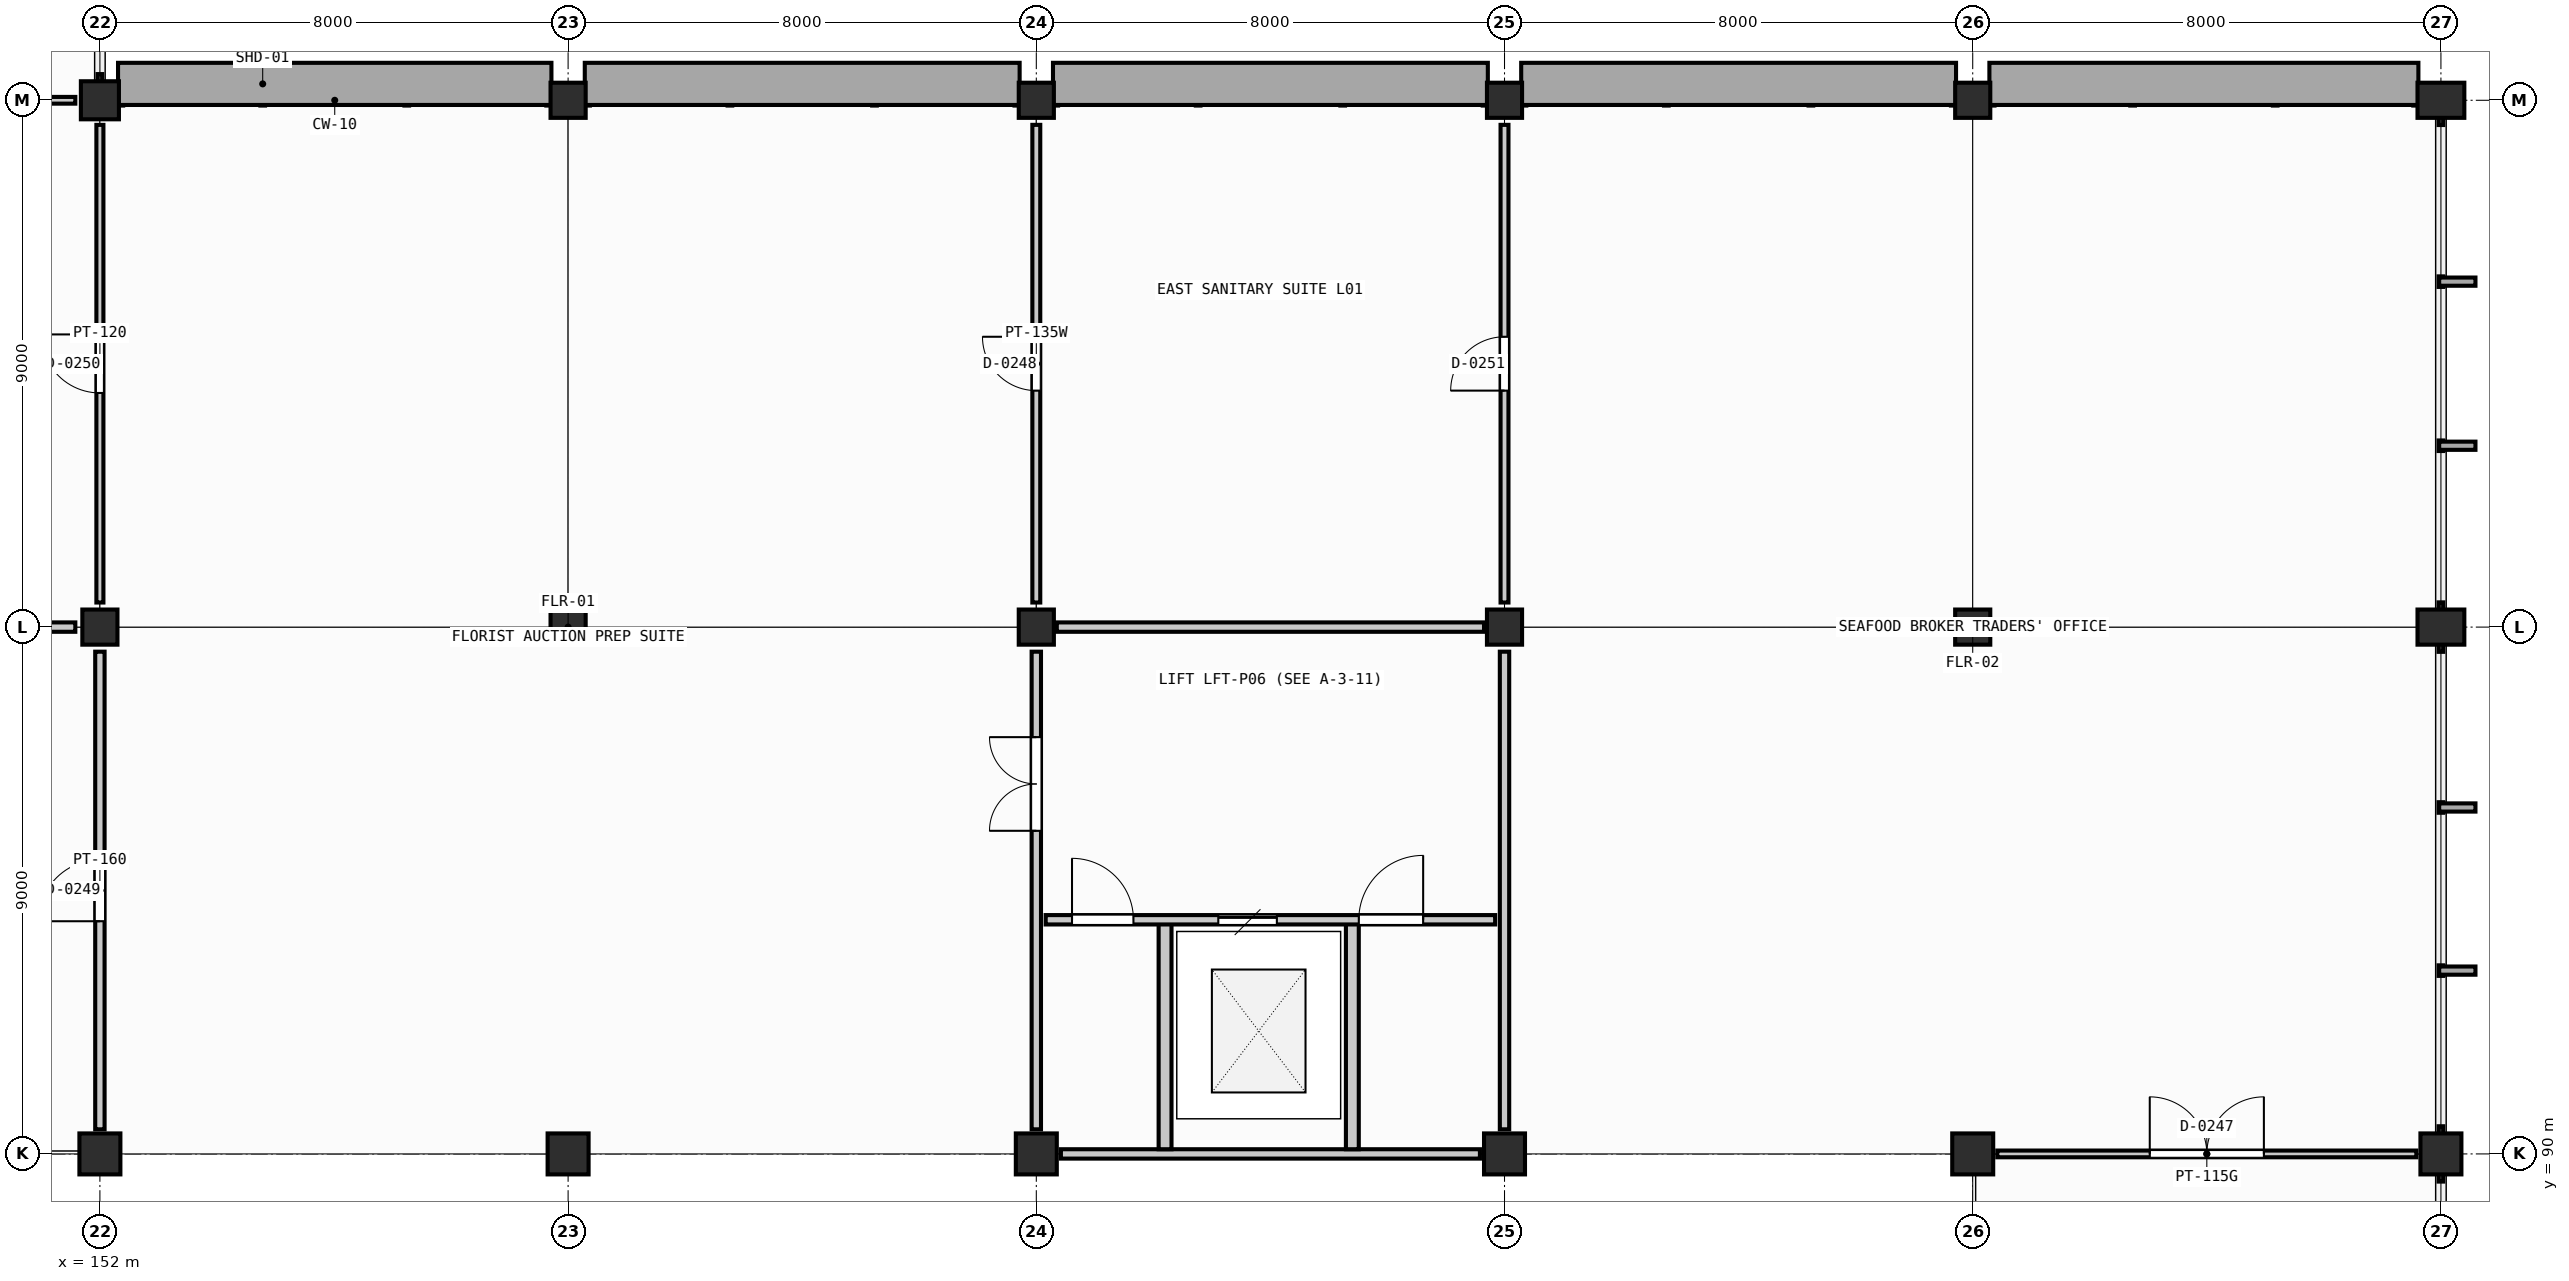
"""IFC4 building model, lengths in metres.
Left out: names, types, materials, properties, quantities, classifications, styles, units other than length and angle.
Written with IfcOpenShell. Run it as: python <this file> out.ifc"""

import sys

from ifc_helpers import new_model, si_unit, direction, frame, frame_2d, origin, origin_2d, place, context, subcontext, project, spatial, rectangle, extrude, element, fill, save


model = new_model("IFC4")
c1 = context("Model", 3, precision=1e-05, world=origin(), true_north=direction((0.0, 1.0)))
c2 = subcontext(c1, "Body", "Model", "MODEL_VIEW")
j1 = project(units=[si_unit("LENGTHUNIT", "METRE"), si_unit("PLANEANGLEUNIT", "RADIAN")], contexts=[c1])
p1 = place(None, origin())
s1 = spatial("IfcSite", under=j1, at=p1, CompositionType="ELEMENT")
p2 = place(p1, origin())
s2 = spatial("IfcBuilding", under=s1, at=p2, CompositionType="ELEMENT")
p3 = place(p2, frame((0.0, 0.0, 4.8)))
s3 = spatial("IfcBuildingStorey", under=s2, at=p3, CompositionType="ELEMENT", Elevation=4.8)
p4 = place(p3, frame((152.0, 90.0, 0.0), z_axis=(0.0, 0.0, 1.0), x_axis=(1.0, 0.0, 0.0)))
e1 = element("IfcColumn", 1, at=p4, inside=s3, PredefinedType="COLUMN", context=c2, shape_type="SweptSolid", body=[
    extrude(rectangle(XDim=0.7, YDim=0.7, at=origin_2d()), origin(), (0.0, 0.0, 1.0), 4.2),
])
p5 = place(p3, frame((152.0, 99.0, 0.0), z_axis=(0.0, 0.0, 1.0), x_axis=(1.0, 0.0, 0.0)))
e2 = element("IfcColumn", 2, at=p5, inside=s3, PredefinedType="COLUMN", context=c2, shape_type="SweptSolid", body=[
    extrude(rectangle(XDim=0.6, YDim=0.6, at=origin_2d()), origin(), (0.0, 0.0, 1.0), 4.2),
])
p6 = place(p3, frame((152.0, 108.0, 0.0), z_axis=(0.0, 0.0, 1.0), x_axis=(1.0, 0.0, 0.0)))
e3 = element("IfcColumn", 3, at=p6, inside=s3, PredefinedType="COLUMN", context=c2, shape_type="SweptSolid", body=[
    extrude(rectangle(XDim=0.65, YDim=0.65, at=origin_2d()), origin(), (0.0, 0.0, 1.0), 4.2),
])
p7 = place(p3, frame((160.0, 90.0, 0.0), z_axis=(0.0, 0.0, 1.0), x_axis=(1.0, 0.0, 0.0)))
e4 = element("IfcColumn", 4, at=p7, inside=s3, PredefinedType="COLUMN", context=c2, shape_type="SweptSolid", body=[
    extrude(rectangle(XDim=0.7, YDim=0.7, at=origin_2d()), origin(), (0.0, 0.0, 1.0), 4.2),
])
for number, where, z_axis, x_axis in (
    (5, (160.0, 99.0, 0.0), (0.0, 0.0, 1.0), (1.0, 0.0, 0.0)),
    (6, (160.0, 108.0, 0.0), (0.0, 0.0, 1.0), (1.0, 0.0, 0.0)),
):
    element("IfcColumn", number, at=place(p3, frame(where, z_axis=z_axis, x_axis=x_axis)), inside=s3, PredefinedType="COLUMN", context=c2, shape_type="SweptSolid", body=[
        extrude(rectangle(XDim=0.6, YDim=0.6, at=origin_2d()), origin(), (0.0, 0.0, 1.0), 4.2),
    ])
p8 = place(p3, frame((168.0, 90.0, 0.0), z_axis=(0.0, 0.0, 1.0), x_axis=(1.0, 0.0, 0.0)))
e7 = element("IfcColumn", 7, at=p8, inside=s3, PredefinedType="COLUMN", context=c2, shape_type="SweptSolid", body=[
    extrude(rectangle(XDim=0.7, YDim=0.7, at=origin_2d()), origin(), (0.0, 0.0, 1.0), 4.2),
])
for number, where, z_axis, x_axis in (
    (8, (168.0, 99.0, 0.0), (0.0, 0.0, 1.0), (1.0, 0.0, 0.0)),
    (9, (168.0, 108.0, 0.0), (0.0, 0.0, 1.0), (1.0, 0.0, 0.0)),
):
    element("IfcColumn", number, at=place(p3, frame(where, z_axis=z_axis, x_axis=x_axis)), inside=s3, PredefinedType="COLUMN", context=c2, shape_type="SweptSolid", body=[
        extrude(rectangle(XDim=0.6, YDim=0.6, at=origin_2d()), origin(), (0.0, 0.0, 1.0), 4.2),
    ])
p9 = place(p3, frame((176.0, 90.0, 0.0), z_axis=(0.0, 0.0, 1.0), x_axis=(1.0, 0.0, 0.0)))
e10 = element("IfcColumn", 10, at=p9, inside=s3, PredefinedType="COLUMN", context=c2, shape_type="SweptSolid", body=[
    extrude(rectangle(XDim=0.7, YDim=0.7, at=origin_2d()), origin(), (0.0, 0.0, 1.0), 4.2),
])
for number, where, z_axis, x_axis in (
    (11, (176.0, 99.0, 0.0), (0.0, 0.0, 1.0), (1.0, 0.0, 0.0)),
    (12, (176.0, 108.0, 0.0), (0.0, 0.0, 1.0), (1.0, 0.0, 0.0)),
):
    element("IfcColumn", number, at=place(p3, frame(where, z_axis=z_axis, x_axis=x_axis)), inside=s3, PredefinedType="COLUMN", context=c2, shape_type="SweptSolid", body=[
        extrude(rectangle(XDim=0.6, YDim=0.6, at=origin_2d()), origin(), (0.0, 0.0, 1.0), 4.2),
    ])
p10 = place(p3, frame((184.0, 90.0, 0.0), z_axis=(0.0, 0.0, 1.0), x_axis=(1.0, 0.0, 0.0)))
e13 = element("IfcColumn", 13, at=p10, inside=s3, PredefinedType="COLUMN", context=c2, shape_type="SweptSolid", body=[
    extrude(rectangle(XDim=0.7, YDim=0.7, at=origin_2d()), origin(), (0.0, 0.0, 1.0), 4.2),
])
for number, where, z_axis, x_axis in (
    (14, (184.0, 99.0, 0.0), (0.0, 0.0, 1.0), (1.0, 0.0, 0.0)),
    (15, (184.0, 108.0, 0.0), (0.0, 0.0, 1.0), (1.0, 0.0, 0.0)),
):
    element("IfcColumn", number, at=place(p3, frame(where, z_axis=z_axis, x_axis=x_axis)), inside=s3, PredefinedType="COLUMN", context=c2, shape_type="SweptSolid", body=[
        extrude(rectangle(XDim=0.6, YDim=0.6, at=origin_2d()), origin(), (0.0, 0.0, 1.0), 4.2),
    ])
p11 = place(p3, frame((192.0, 90.0, 0.0), z_axis=(0.0, 0.0, 1.0), x_axis=(1.0, 0.0, 0.0)))
e16 = element("IfcColumn", 16, at=p11, inside=s3, PredefinedType="COLUMN", context=c2, shape_type="SweptSolid", body=[
    extrude(rectangle(XDim=0.7, YDim=0.7, at=origin_2d()), origin(), (0.0, 0.0, 1.0), 4.2),
])
for number, where, z_axis, x_axis in (
    (17, (192.0, 99.0, 0.0), (0.0, 0.0, 1.0), (1.0, 0.0, 0.0)),
    (18, (192.0, 108.0, 0.0), (0.0, 0.0, 1.0), (1.0, 0.0, 0.0)),
):
    element("IfcColumn", number, at=place(p3, frame(where, z_axis=z_axis, x_axis=x_axis)), inside=s3, PredefinedType="COLUMN", context=c2, shape_type="SweptSolid", body=[
        extrude(rectangle(XDim=0.8, YDim=0.6, at=origin_2d()), origin(), (0.0, 0.0, 1.0), 4.2),
    ])
p12 = place(p3, frame((168.0, 90.42, 0.0), z_axis=(0.0, 0.0, 1.0), x_axis=(0.0, 1.0, 0.0)))
e19 = element("IfcWall", 19, at=p12, inside=s3, PredefinedType="PARTITIONING", context=c2, shape_type="SweptSolid", body=[
    extrude(rectangle(XDim=8.16, YDim=0.16, at=frame_2d((4.08, 0.0))), origin(), (0.0, 0.0, 1.0), 3.05),
])
p13 = place(p12, frame((5.1, 0.0, 0.0)))
e20 = element("IfcOpeningElement", 20, at=p13, cuts=e19, PredefinedType="OPENING", context=c2, shape_type="SweptSolid", body=[
    extrude(rectangle(XDim=1.6, YDim=2.2, at=frame_2d((0.8, 1.1))), frame((0.0, 0.09, 0.0), z_axis=(0.0, -1.0, 0.0), x_axis=(1.0, 0.0, 0.0)), (0.0, 0.0, 1.0), 0.18),
])
p14 = place(p3, frame((176.0, 90.42, 0.0), z_axis=(0.0, 0.0, 1.0), x_axis=(0.0, 1.0, 0.0)))
e21 = element("IfcWall", 21, at=p14, inside=s3, PredefinedType="PARTITIONING", context=c2, shape_type="SweptSolid", body=[
    extrude(rectangle(XDim=8.16, YDim=0.16, at=frame_2d((4.08, 0.0))), origin(), (0.0, 0.0, 1.0), 3.05),
])
p15 = place(p3, frame((168.42, 90.0, 0.0), z_axis=(0.0, 0.0, 1.0), x_axis=(1.0, 0.0, 0.0)))
e22 = element("IfcWall", 22, at=p15, inside=s3, PredefinedType="PARTITIONING", context=c2, shape_type="SweptSolid", body=[
    extrude(rectangle(XDim=7.16, YDim=0.16, at=frame_2d((3.58, 0.0))), origin(), (0.0, 0.0, 1.0), 3.05),
])
for number, where, z_axis, x_axis in (
    (23, (170.2, 90.08, 0.0), (0.0, 0.0, 1.0), (0.0, 1.0, 0.0)),
    (24, (173.4, 90.08, 0.0), (0.0, 0.0, 1.0), (0.0, 1.0, 0.0)),
):
    element("IfcWall", number, at=place(p3, frame(where, z_axis=z_axis, x_axis=x_axis)), inside=s3, PredefinedType="SOLIDWALL", context=c2, shape_type="SweptSolid", body=[
        extrude(rectangle(XDim=3.92, YDim=0.22, at=frame_2d((1.96, 0.0))), origin(), (0.0, 0.0, 1.0), 3.05),
    ])
p16 = place(p3, frame((168.16, 94.0, 0.0), z_axis=(0.0, 0.0, 1.0), x_axis=(1.0, 0.0, 0.0)))
e25 = element("IfcWall", 25, at=p16, inside=s3, PredefinedType="PARTITIONING", context=c2, shape_type="SweptSolid", body=[
    extrude(rectangle(XDim=7.68, YDim=0.16, at=frame_2d((3.84, 0.0))), origin(), (0.0, 0.0, 1.0), 3.05),
])
p17 = place(p16, frame((0.45, 0.0, 0.0)))
e26 = element("IfcOpeningElement", 26, at=p17, cuts=e25, PredefinedType="OPENING", context=c2, shape_type="SweptSolid", body=[
    extrude(rectangle(XDim=1.05, YDim=2.1, at=frame_2d((0.525, 1.05))), frame((0.0, 0.09, 0.0), z_axis=(0.0, -1.0, 0.0), x_axis=(1.0, 0.0, 0.0)), (0.0, 0.0, 1.0), 0.18),
])
p18 = place(p16, frame((2.95, 0.0, 0.0)))
e27 = element("IfcOpeningElement", 27, at=p18, cuts=e25, PredefinedType="OPENING", context=c2, shape_type="SweptSolid", body=[
    extrude(rectangle(XDim=1.0, YDim=2.15, at=frame_2d((0.5, 1.075))), frame((0.0, 0.09, 0.0), z_axis=(0.0, -1.0, 0.0), x_axis=(1.0, 0.0, 0.0)), (0.0, 0.0, 1.0), 0.18),
])
p19 = place(p16, frame((5.35, 0.0, 0.0)))
e28 = element("IfcOpeningElement", 28, at=p19, cuts=e25, PredefinedType="OPENING", context=c2, shape_type="SweptSolid", body=[
    extrude(rectangle(XDim=1.1, YDim=2.15, at=frame_2d((0.55, 1.075))), frame((0.0, 0.09, 0.0), z_axis=(0.0, -1.0, 0.0), x_axis=(1.0, 0.0, 0.0)), (0.0, 0.0, 1.0), 0.18),
])
p20 = place(p3, frame((168.35, 99.0, 0.0), z_axis=(0.0, 0.0, 1.0), x_axis=(1.0, 0.0, 0.0)))
e29 = element("IfcWall", 29, at=p20, inside=s3, PredefinedType="PARTITIONING", context=c2, shape_type="SweptSolid", body=[
    extrude(rectangle(XDim=7.3, YDim=0.16, at=frame_2d((3.65, 0.0))), origin(), (0.0, 0.0, 1.0), 3.05),
])
p21 = place(p3, frame((184.42, 90.0, 0.0), z_axis=(0.0, 0.0, 1.0), x_axis=(1.0, 0.0, 0.0)))
e30 = element("IfcWall", 30, at=p21, inside=s3, PredefinedType="PARTITIONING", context=c2, shape_type="SweptSolid", body=[
    extrude(rectangle(XDim=7.16, YDim=0.115, at=frame_2d((3.58, 0.0))), origin(), (0.0, 0.0, 1.0), 3.05),
])
p22 = place(p21, frame((2.605, 0.0, 0.0)))
e31 = element("IfcOpeningElement", 31, at=p22, cuts=e30, PredefinedType="OPENING", context=c2, shape_type="SweptSolid", body=[
    extrude(rectangle(XDim=1.95, YDim=2.3, at=frame_2d((0.975, 1.15))), frame((0.0, 0.067, 0.0), z_axis=(0.0, -1.0, 0.0), x_axis=(1.0, 0.0, 0.0)), (0.0, 0.0, 1.0), 0.135),
])
p23 = place(p3, frame((168.0, 99.42, 0.0), z_axis=(0.0, 0.0, 1.0), x_axis=(0.0, 1.0, 0.0)))
e32 = element("IfcWall", 32, at=p23, inside=s3, PredefinedType="PLUMBINGWALL", context=c2, shape_type="SweptSolid", body=[
    extrude(rectangle(XDim=8.16, YDim=0.135, at=frame_2d((4.08, 0.0))), origin(), (0.0, 0.0, 1.0), 3.05),
])
p24 = place(p23, frame((3.62, 0.0, 0.0)))
e33 = element("IfcOpeningElement", 33, at=p24, cuts=e32, PredefinedType="OPENING", context=c2, shape_type="SweptSolid", body=[
    extrude(rectangle(XDim=0.92, YDim=2.08, at=frame_2d((0.46, 1.04))), frame((0.0, 0.078, 0.0), z_axis=(0.0, -1.0, 0.0), x_axis=(1.0, 0.0, 0.0)), (0.0, 0.0, 1.0), 0.155),
])
p25 = place(p3, frame((152.0, 90.42, 0.0), z_axis=(0.0, 0.0, 1.0), x_axis=(0.0, 1.0, 0.0)))
e34 = element("IfcWall", 34, at=p25, inside=s3, PredefinedType="PARTITIONING", context=c2, shape_type="SweptSolid", body=[
    extrude(rectangle(XDim=8.16, YDim=0.16, at=frame_2d((4.08, 0.0))), origin(), (0.0, 0.0, 1.0), 3.05),
])
p26 = place(p25, frame((3.555, 0.0, 0.0)))
e35 = element("IfcOpeningElement", 35, at=p26, cuts=e34, PredefinedType="OPENING", context=c2, shape_type="SweptSolid", body=[
    extrude(rectangle(XDim=1.05, YDim=2.15, at=frame_2d((0.525, 1.075))), frame((0.0, 0.09, 0.0), z_axis=(0.0, -1.0, 0.0), x_axis=(1.0, 0.0, 0.0)), (0.0, 0.0, 1.0), 0.18),
])
p27 = place(p3, frame((152.0, 99.42, 0.0), z_axis=(0.0, 0.0, 1.0), x_axis=(0.0, 1.0, 0.0)))
e36 = element("IfcWall", 36, at=p27, inside=s3, PredefinedType="PARTITIONING", context=c2, shape_type="SweptSolid", body=[
    extrude(rectangle(XDim=8.16, YDim=0.12, at=frame_2d((4.08, 0.0))), origin(), (0.0, 0.0, 1.0), 3.05),
])
p28 = place(p27, frame((3.58, 0.0, 0.0)))
e37 = element("IfcOpeningElement", 37, at=p28, cuts=e36, PredefinedType="OPENING", context=c2, shape_type="SweptSolid", body=[
    extrude(rectangle(XDim=1.0, YDim=2.1, at=frame_2d((0.5, 1.05))), frame((0.0, 0.07, 0.0), z_axis=(0.0, -1.0, 0.0), x_axis=(1.0, 0.0, 0.0)), (0.0, 0.0, 1.0), 0.14),
])
p29 = place(p3, frame((176.0, 99.42, 0.0), z_axis=(0.0, 0.0, 1.0), x_axis=(0.0, 1.0, 0.0)))
e38 = element("IfcWall", 38, at=p29, inside=s3, PredefinedType="PLUMBINGWALL", context=c2, shape_type="SweptSolid", body=[
    extrude(rectangle(XDim=8.16, YDim=0.135, at=frame_2d((4.08, 0.0))), origin(), (0.0, 0.0, 1.0), 3.05),
])
p30 = place(p29, frame((3.62, 0.0, 0.0)))
e39 = element("IfcOpeningElement", 39, at=p30, cuts=e38, PredefinedType="OPENING", context=c2, shape_type="SweptSolid", body=[
    extrude(rectangle(XDim=0.92, YDim=2.08, at=frame_2d((0.46, 1.04))), frame((0.0, 0.078, 0.0), z_axis=(0.0, -1.0, 0.0), x_axis=(1.0, 0.0, 0.0)), (0.0, 0.0, 1.0), 0.155),
])
p31 = place(p3, frame((144.42, 99.0, 0.0), z_axis=(0.0, 0.0, 1.0), x_axis=(1.0, 0.0, 0.0)))
e40 = element("IfcWall", 40, at=p31, inside=s3, PredefinedType="PARTITIONING", context=c2, shape_type="SweptSolid", body=[
    extrude(rectangle(XDim=7.16, YDim=0.16, at=frame_2d((3.58, 0.0))), origin(), (0.0, 0.0, 1.0), 3.05),
])
p32 = place(p31, frame((3.01, 0.0, 0.0)))
e41 = element("IfcOpeningElement", 41, at=p32, cuts=e40, PredefinedType="OPENING", context=c2, shape_type="SweptSolid", body=[
    extrude(rectangle(XDim=1.14, YDim=2.19, at=frame_2d((0.57, 1.095))), frame((0.0, 0.09, 0.0), z_axis=(0.0, -1.0, 0.0), x_axis=(1.0, 0.0, 0.0)), (0.0, 0.0, 1.0), 0.18),
])
p33 = place(p3, frame((144.42, 108.0, 0.0), z_axis=(0.0, 0.0, 1.0), x_axis=(1.0, 0.0, 0.0)))
e42 = element("IfcWall", 42, at=p33, inside=s3, PredefinedType="PARTITIONING", context=c2, shape_type="SweptSolid", body=[
    extrude(rectangle(XDim=7.16, YDim=0.115, at=frame_2d((3.58, 0.0))), origin(), (0.0, 0.0, 1.0), 3.05),
])
p34 = place(p33, frame((2.38, 0.0, 0.0)))
e43 = element("IfcOpeningElement", 43, at=p34, cuts=e42, PredefinedType="OPENING", context=c2, shape_type="SweptSolid", body=[
    extrude(rectangle(XDim=2.4, YDim=2.4, at=frame_2d((1.2, 1.2))), frame((0.0, 0.067, 0.0), z_axis=(0.0, -1.0, 0.0), x_axis=(1.0, 0.0, 0.0)), (0.0, 0.0, 1.0), 0.135),
])
p35 = place(p17, origin())
e44 = element("IfcDoor", 44, at=p35, inside=s3, OperationType="SINGLE_SWING_LEFT", PredefinedType="DOOR", context=c2, shape_type="SweptSolid", body=[
    extrude(rectangle(XDim=1.05, YDim=2.1, at=frame_2d((0.525, 1.05))), frame((0.0, 0.025, 0.0), z_axis=(0.0, -1.0, 0.0), x_axis=(1.0, 0.0, 0.0)), (0.0, 0.0, 1.0), 0.05),
])
fill(e26, e44)
p36 = place(p18, origin())
e45 = element("IfcDoor", 45, at=p36, inside=s3, OperationType="SLIDING_TO_LEFT", PredefinedType="DOOR", context=c2, shape_type="SweptSolid", body=[
    extrude(rectangle(XDim=1.0, YDim=2.15, at=frame_2d((0.5, 1.075))), frame((0.0, 0.025, 0.0), z_axis=(0.0, -1.0, 0.0), x_axis=(1.0, 0.0, 0.0)), (0.0, 0.0, 1.0), 0.05),
])
fill(e27, e45)
p37 = place(p19, origin())
e46 = element("IfcDoor", 46, at=p37, inside=s3, OperationType="SINGLE_SWING_RIGHT", PredefinedType="DOOR", context=c2, shape_type="SweptSolid", body=[
    extrude(rectangle(XDim=1.1, YDim=2.15, at=frame_2d((0.55, 1.075))), frame((0.0, 0.025, 0.0), z_axis=(0.0, -1.0, 0.0), x_axis=(1.0, 0.0, 0.0)), (0.0, 0.0, 1.0), 0.05),
])
fill(e28, e46)
p38 = place(p13, origin())
e47 = element("IfcDoor", 47, at=p38, inside=s3, OperationType="DOUBLE_DOOR_SINGLE_SWING", PredefinedType="DOOR", context=c2, shape_type="SweptSolid", body=[
    extrude(rectangle(XDim=1.6, YDim=2.2, at=frame_2d((0.8, 1.1))), frame((0.0, 0.025, 0.0), z_axis=(0.0, -1.0, 0.0), x_axis=(1.0, 0.0, 0.0)), (0.0, 0.0, 1.0), 0.05),
])
fill(e20, e47)
p39 = place(p22, origin())
e48 = element("IfcDoor", 48, at=p39, inside=s3, OperationType="DOUBLE_DOOR_SINGLE_SWING", PredefinedType="DOOR", context=c2, shape_type="SweptSolid", body=[
    extrude(rectangle(XDim=1.95, YDim=2.3, at=frame_2d((0.975, 1.15))), frame((0.0, 0.025, 0.0), z_axis=(0.0, -1.0, 0.0), x_axis=(1.0, 0.0, 0.0)), (0.0, 0.0, 1.0), 0.05),
])
fill(e31, e48)
p40 = place(p24, origin())
e49 = element("IfcDoor", 49, at=p40, inside=s3, OperationType="SINGLE_SWING_RIGHT", PredefinedType="DOOR", context=c2, shape_type="SweptSolid", body=[
    extrude(rectangle(XDim=0.92, YDim=2.08, at=frame_2d((0.46, 1.04))), frame((0.0, 0.025, 0.0), z_axis=(0.0, -1.0, 0.0), x_axis=(1.0, 0.0, 0.0)), (0.0, 0.0, 1.0), 0.05),
])
fill(e33, e49)
p41 = place(p26, origin())
e50 = element("IfcDoor", 50, at=p41, inside=s3, OperationType="SINGLE_SWING_LEFT", PredefinedType="DOOR", context=c2, shape_type="SweptSolid", body=[
    extrude(rectangle(XDim=1.05, YDim=2.15, at=frame_2d((0.525, 1.075))), frame((0.0, 0.025, 0.0), z_axis=(0.0, -1.0, 0.0), x_axis=(1.0, 0.0, 0.0)), (0.0, 0.0, 1.0), 0.05),
])
fill(e35, e50)
p42 = place(p28, origin())
e51 = element("IfcDoor", 51, at=p42, inside=s3, OperationType="SINGLE_SWING_RIGHT", PredefinedType="DOOR", context=c2, shape_type="SweptSolid", body=[
    extrude(rectangle(XDim=1.0, YDim=2.1, at=frame_2d((0.5, 1.05))), frame((0.0, 0.025, 0.0), z_axis=(0.0, -1.0, 0.0), x_axis=(1.0, 0.0, 0.0)), (0.0, 0.0, 1.0), 0.05),
])
fill(e37, e51)
p43 = place(p30, origin())
e52 = element("IfcDoor", 52, at=p43, inside=s3, OperationType="SINGLE_SWING_LEFT", PredefinedType="DOOR", context=c2, shape_type="SweptSolid", body=[
    extrude(rectangle(XDim=0.92, YDim=2.08, at=frame_2d((0.46, 1.04))), frame((0.0, 0.025, 0.0), z_axis=(0.0, -1.0, 0.0), x_axis=(1.0, 0.0, 0.0)), (0.0, 0.0, 1.0), 0.05),
])
fill(e39, e52)
save(model, sys.argv[1])
